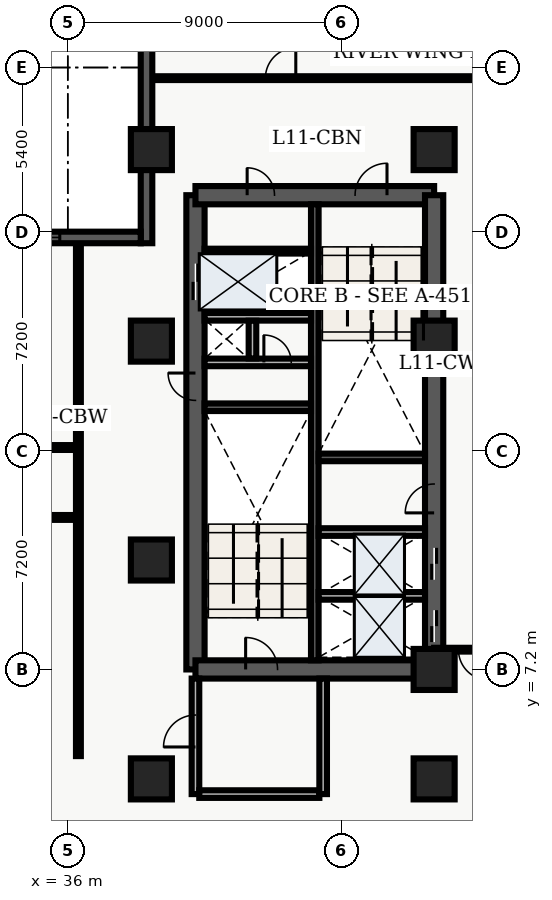
"""IFC4 building model, lengths in metres.
Left out: names, types, materials, properties, quantities, classifications, styles, units other than length and angle.
Written with IfcOpenShell. Run it as: python <this file> out.ifc"""

import sys

from ifc_helpers import new_model, entity, si_unit, converted_unit, direction, frame, origin_with_axes, origin_2d_with_axis, place, context, subcontext, project, spatial, polyline, rectangle, outline, extrude, element, fill, save


model = new_model("IFC4")
c1 = context("Model", 3, precision=1e-05, world=origin_with_axes(), true_north=direction((0.0, 1.0)))
c2 = subcontext(c1, "Body", "Model", "MODEL_VIEW")
j1 = project(units=[si_unit("LENGTHUNIT", "METRE"), converted_unit("PLANEANGLEUNIT", "DEGREE", entity("IfcPlaneAngleMeasure", 0.017), si_unit("PLANEANGLEUNIT", "RADIAN"), dimensions=[0, 0, 0, 0, 0, 0, 0])], contexts=[c1])
p1 = place(None, origin_with_axes())
s1 = spatial("IfcSite", under=j1, at=p1, CompositionType="ELEMENT")
p2 = place(p1, origin_with_axes())
s2 = spatial("IfcBuilding", under=s1, at=p2, CompositionType="ELEMENT")
p3 = place(p2, frame((0.0, 0.0, 48.3), z_axis=(0.0, 0.0, 1.0), x_axis=(1.0, 0.0, 0.0)))
s3 = spatial("IfcBuildingStorey", under=s2, at=p3, CompositionType="ELEMENT", Elevation=48.3)
p4 = place(p3, frame((40.2, 7.2, 0.0), z_axis=(0.0, 0.0, 1.0), x_axis=(0.0, 1.0, 0.0)))
e1 = element("IfcWall", 1, at=p4, inside=s3, PredefinedType="SHEAR", context=c2, shape_type="SweptSolid", body=[
    extrude(outline(polyline([(0.0, -0.3), (15.6, -0.3), (15.6, 0.3), (0.0, 0.3), (0.0, -0.3)])), origin_with_axes(), (0.0, 0.0, 1.0), 3.66),
])
p5 = place(p4, frame((12.75, 0.0, 0.0), z_axis=(0.0, 0.0, 1.0), x_axis=(1.0, 0.0, 0.0)))
e2 = element("IfcOpeningElement", 2, at=p5, cuts=e1, PredefinedType="OPENING", context=c2, shape_type="SweptSolid", body=[
    extrude(rectangle(XDim=1.2, YDim=0.62, at=origin_2d_with_axis()), origin_with_axes(), (0.0, 0.0, 1.0), 2.15),
])
p6 = place(p4, frame((9.3, 0.0, 0.0), z_axis=(0.0, 0.0, 1.0), x_axis=(1.0, 0.0, 0.0)))
e3 = element("IfcOpeningElement", 3, at=p6, cuts=e1, PredefinedType="OPENING", context=c2, shape_type="SweptSolid", body=[
    extrude(rectangle(XDim=0.9, YDim=0.62, at=origin_2d_with_axis()), origin_with_axes(), (0.0, 0.0, 1.0), 2.15),
])
p7 = place(p3, frame((40.2, 7.2, 0.0), z_axis=(0.0, 0.0, 1.0), x_axis=(1.0, 0.0, 0.0)))
e4 = element("IfcWall", 4, at=p7, inside=s3, PredefinedType="SHEAR", context=c2, shape_type="SweptSolid", body=[
    extrude(outline(polyline([(0.0, -0.3), (7.85, -0.3), (7.85, 0.3), (0.0, 0.3), (0.0, -0.3)])), origin_with_axes(), (0.0, 0.0, 1.0), 3.66),
])
p8 = place(p7, frame((2.175, 0.0, 0.0), z_axis=(0.0, 0.0, 1.0), x_axis=(1.0, 0.0, 0.0)))
e5 = element("IfcOpeningElement", 5, at=p8, cuts=e4, PredefinedType="OPENING", context=c2, shape_type="SweptSolid", body=[
    extrude(rectangle(XDim=1.05, YDim=0.62, at=origin_2d_with_axis()), origin_with_axes(), (0.0, 0.0, 1.0), 2.15),
])
p9 = place(p3, frame((40.2, 22.8, 0.0), z_axis=(0.0, 0.0, 1.0), x_axis=(1.0, 0.0, 0.0)))
e6 = element("IfcWall", 6, at=p9, inside=s3, PredefinedType="SHEAR", context=c2, shape_type="SweptSolid", body=[
    extrude(outline(polyline([(0.0, -0.3), (7.85, -0.3), (7.85, 0.3), (0.0, 0.3), (0.0, -0.3)])), origin_with_axes(), (0.0, 0.0, 1.0), 3.66),
])
p10 = place(p9, frame((5.775, 0.0, 0.0), z_axis=(0.0, 0.0, 1.0), x_axis=(1.0, 0.0, 0.0)))
e7 = element("IfcOpeningElement", 7, at=p10, cuts=e6, PredefinedType="OPENING", context=c2, shape_type="SweptSolid", body=[
    extrude(rectangle(XDim=1.05, YDim=0.62, at=origin_2d_with_axis()), origin_with_axes(), (0.0, 0.0, 1.0), 2.15),
])
p11 = place(p9, frame((2.15, 0.0, 0.0), z_axis=(0.0, 0.0, 1.0), x_axis=(1.0, 0.0, 0.0)))
e8 = element("IfcOpeningElement", 8, at=p11, cuts=e6, PredefinedType="OPENING", context=c2, shape_type="SweptSolid", body=[
    extrude(rectangle(XDim=0.9, YDim=0.62, at=origin_2d_with_axis()), origin_with_axes(), (0.0, 0.0, 1.0), 2.15),
])
p12 = place(p3, frame((48.05, 7.2, 0.0), z_axis=(0.0, 0.0, 1.0), x_axis=(0.0, 1.0, 0.0)))
e9 = element("IfcWall", 9, at=p12, inside=s3, PredefinedType="SHEAR", context=c2, shape_type="SweptSolid", body=[
    extrude(outline(polyline([(0.0, -0.3), (15.6, -0.3), (15.6, 0.3), (0.0, 0.3), (0.0, -0.3)])), origin_with_axes(), (0.0, 0.0, 1.0), 3.66),
])
p13 = place(p12, frame((1.425, 0.0, 0.0), z_axis=(0.0, 0.0, 1.0), x_axis=(1.0, 0.0, 0.0)))
e10 = element("IfcOpeningElement", 10, at=p13, cuts=e9, PredefinedType="OPENING", context=c2, shape_type="SweptSolid", body=[
    extrude(rectangle(XDim=1.05, YDim=0.62, at=origin_2d_with_axis()), origin_with_axes(), (0.0, 0.0, 1.0), 2.15),
])
p14 = place(p12, frame((3.475, 0.0, 0.0), z_axis=(0.0, 0.0, 1.0), x_axis=(1.0, 0.0, 0.0)))
e11 = element("IfcOpeningElement", 11, at=p14, cuts=e9, PredefinedType="OPENING", context=c2, shape_type="SweptSolid", body=[
    extrude(rectangle(XDim=1.05, YDim=0.62, at=origin_2d_with_axis()), origin_with_axes(), (0.0, 0.0, 1.0), 2.15),
])
p15 = place(p12, frame((5.625, 0.0, 0.0), z_axis=(0.0, 0.0, 1.0), x_axis=(1.0, 0.0, 0.0)))
e12 = element("IfcOpeningElement", 12, at=p15, cuts=e9, PredefinedType="OPENING", context=c2, shape_type="SweptSolid", body=[
    extrude(rectangle(XDim=0.95, YDim=0.62, at=origin_2d_with_axis()), origin_with_axes(), (0.0, 0.0, 1.0), 2.15),
])
p16 = place(p3, frame((44.125, 7.5, 0.0), z_axis=(0.0, 0.0, 1.0), x_axis=(0.0, 1.0, 0.0)))
e13 = element("IfcWall", 13, at=p16, inside=s3, PredefinedType="SHEAR", context=c2, shape_type="SweptSolid", body=[
    extrude(outline(polyline([(0.0, -0.125), (15.0, -0.125), (15.0, 0.125), (0.0, 0.125), (0.0, -0.125)])), origin_with_axes(), (0.0, 0.0, 1.0), 3.66),
])
for number, where, z_axis, x_axis in (
    (14, (40.5, 15.825, 0.0), (0.0, 0.0, 1.0), (1.0, 0.0, 0.0)),
    (15, (44.25, 14.175, 0.0), (0.0, 0.0, 1.0), (1.0, 0.0, 0.0)),
):
    element("IfcWall", number, at=place(p3, frame(where, z_axis=z_axis, x_axis=x_axis)), inside=s3, PredefinedType="SHEAR", context=c2, shape_type="SweptSolid", body=[
        extrude(outline(polyline([(0.0, -0.125), (3.5, -0.125), (3.5, 0.125), (0.0, 0.125), (0.0, -0.125)])), origin_with_axes(), (0.0, 0.0, 1.0), 3.66),
    ])
p17 = place(p3, frame((40.5, 17.3, 0.0), z_axis=(0.0, 0.0, 1.0), x_axis=(1.0, 0.0, 0.0)))
e16 = element("IfcWall", 16, at=p17, inside=s3, PredefinedType="SOLIDWALL", context=c2, shape_type="SweptSolid", body=[
    extrude(outline(polyline([(0.0, -0.125), (3.5, -0.125), (3.5, 0.125), (0.0, 0.125), (0.0, -0.125)])), origin_with_axes(), (0.0, 0.0, 1.0), 2.7),
])
p18 = place(p17, frame((2.4, 0.0, 0.0), z_axis=(0.0, 0.0, 1.0), x_axis=(1.0, 0.0, 0.0)))
e17 = element("IfcOpeningElement", 17, at=p18, cuts=e16, PredefinedType="OPENING", context=c2, shape_type="SweptSolid", body=[
    extrude(rectangle(XDim=0.9, YDim=0.27, at=origin_2d_with_axis()), origin_with_axes(), (0.0, 0.0, 1.0), 2.15),
])
p19 = place(p3, frame((40.5, 18.8, 0.0), z_axis=(0.0, 0.0, 1.0), x_axis=(1.0, 0.0, 0.0)))
e18 = element("IfcWall", 18, at=p19, inside=s3, PredefinedType="SOLIDWALL", context=c2, shape_type="SweptSolid", body=[
    extrude(outline(polyline([(0.0, -0.125), (3.5, -0.125), (3.5, 0.125), (0.0, 0.125), (0.0, -0.125)])), origin_with_axes(), (0.0, 0.0, 1.0), 2.7),
])
p20 = place(p3, frame((42.075, 17.43, 0.0), z_axis=(0.0, 0.0, 1.0), x_axis=(0.0, 1.0, 0.0)))
e19 = element("IfcWall", 19, at=p20, inside=s3, PredefinedType="SOLIDWALL", context=c2, shape_type="SweptSolid", body=[
    extrude(outline(polyline([(0.0, -0.125), (1.24, -0.125), (1.24, 0.125), (0.0, 0.125), (0.0, -0.125)])), origin_with_axes(), (0.0, 0.0, 1.0), 2.7),
])
p21 = place(p3, frame((40.2, 3.1, 0.0), z_axis=(0.0, 0.0, 1.0), x_axis=(0.0, 1.0, 0.0)))
e20 = element("IfcWall", 20, at=p21, inside=s3, PredefinedType="SOLIDWALL", context=c2, shape_type="SweptSolid", body=[
    extrude(outline(polyline([(0.0, -0.125), (3.8, -0.125), (3.8, 0.125), (0.0, 0.125), (0.0, -0.125)])), origin_with_axes(), (0.0, 0.0, 1.0), 2.7),
])
p22 = place(p21, frame((2.075, 0.0, 0.0), z_axis=(0.0, 0.0, 1.0), x_axis=(1.0, 0.0, 0.0)))
e21 = element("IfcOpeningElement", 21, at=p22, cuts=e20, PredefinedType="OPENING", context=c2, shape_type="SweptSolid", body=[
    extrude(rectangle(XDim=1.05, YDim=0.27, at=origin_2d_with_axis()), origin_with_axes(), (0.0, 0.0, 1.0), 2.15),
])
p23 = place(p3, frame((40.325, 3.1, 0.0), z_axis=(0.0, 0.0, 1.0), x_axis=(1.0, 0.0, 0.0)))
e22 = element("IfcWall", 22, at=p23, inside=s3, PredefinedType="SOLIDWALL", context=c2, shape_type="SweptSolid", body=[
    extrude(outline(polyline([(0.0, -0.125), (3.95, -0.125), (3.95, 0.125), (0.0, 0.125), (0.0, -0.125)])), origin_with_axes(), (0.0, 0.0, 1.0), 2.7),
])
p24 = place(p3, frame((44.4, 3.1, 0.0), z_axis=(0.0, 0.0, 1.0), x_axis=(0.0, 1.0, 0.0)))
e23 = element("IfcWall", 23, at=p24, inside=s3, PredefinedType="SOLIDWALL", context=c2, shape_type="SweptSolid", body=[
    extrude(outline(polyline([(0.0, -0.125), (3.8, -0.125), (3.8, 0.125), (0.0, 0.125), (0.0, -0.125)])), origin_with_axes(), (0.0, 0.0, 1.0), 2.7),
])
for number, where, z_axis, x_axis in (
    (24, (38.75, 3.6, 0.0), (0.0, 0.0, 1.0), (1.0, 0.0, 0.0)),
    (25, (38.75, 10.8, 0.0), (0.0, 0.0, 1.0), (1.0, 0.0, 0.0)),
    (26, (38.75, 18.0, 0.0), (0.0, 0.0, 1.0), (1.0, 0.0, 0.0)),
    (27, (38.75, 24.3, 0.0), (0.0, 0.0, 1.0), (1.0, 0.0, 0.0)),
    (28, (48.05, 3.6, 0.0), (0.0, 0.0, 1.0), (1.0, 0.0, 0.0)),
    (29, (48.05, 7.2, 0.0), (0.0, 0.0, 1.0), (1.0, 0.0, 0.0)),
    (30, (48.05, 18.0, 0.0), (0.0, 0.0, 1.0), (1.0, 0.0, 0.0)),
    (31, (48.05, 24.3, 0.0), (0.0, 0.0, 1.0), (1.0, 0.0, 0.0)),
):
    element("IfcColumn", number, at=place(p3, frame(where, z_axis=z_axis, x_axis=x_axis)), inside=s3, PredefinedType="COLUMN", context=c2, shape_type="SweptSolid", body=[
        extrude(rectangle(XDim=1.35, YDim=1.35, at=origin_2d_with_axis()), origin_with_axes(), (0.0, 0.0, 1.0), 3.9),
    ])
p25 = place(p3, frame((40.5, 20.96, 0.0), z_axis=(0.0, 0.0, 1.0), x_axis=(1.0, 0.0, 0.0)))
e32 = element("IfcWall", 32, at=p25, inside=s3, PredefinedType="PARTITIONING", context=c2, shape_type="SweptSolid", body=[
    extrude(outline(polyline([(0.0, -0.08), (3.5, -0.08), (3.5, 0.08), (0.0, 0.08), (0.0, -0.08)])), origin_with_axes(), (0.0, 0.0, 1.0), 2.7),
])
for number, where, z_axis, x_axis in (
    (33, (44.25, 9.62, 0.0), (0.0, 0.0, 1.0), (1.0, 0.0, 0.0)),
    (34, (44.25, 11.72, 0.0), (0.0, 0.0, 1.0), (1.0, 0.0, 0.0)),
):
    element("IfcWall", number, at=place(p3, frame(where, z_axis=z_axis, x_axis=x_axis)), inside=s3, PredefinedType="SOLIDWALL", context=c2, shape_type="SweptSolid", body=[
        extrude(outline(polyline([(0.0, -0.125), (3.5, -0.125), (3.5, 0.125), (0.0, 0.125), (0.0, -0.125)])), origin_with_axes(), (0.0, 0.0, 1.0), 2.7),
    ])
p26 = place(p3, frame((21.15, 12.2, 0.0), z_axis=(0.0, 0.0, 1.0), x_axis=(1.0, 0.0, 0.0)))
e35 = element("IfcWall", 35, at=p26, inside=s3, PredefinedType="PARTITIONING", context=c2, shape_type="SweptSolid", body=[
    extrude(outline(polyline([(0.0, -0.08), (15.2, -0.08), (15.2, 0.08), (0.0, 0.08), (0.0, -0.08)])), origin_with_axes(), (0.0, 0.0, 1.0), 2.7),
])
p27 = place(p26, frame((3.477, 0.0, 0.0), z_axis=(0.0, 0.0, 1.0), x_axis=(1.0, 0.0, 0.0)))
e36 = element("IfcOpeningElement", 36, at=p27, cuts=e35, PredefinedType="OPENING", context=c2, shape_type="SweptSolid", body=[
    extrude(rectangle(XDim=1.0, YDim=0.18, at=origin_2d_with_axis()), origin_with_axes(), (0.0, 0.0, 1.0), 2.15),
])
p28 = place(p26, frame((10.947, 0.0, 0.0), z_axis=(0.0, 0.0, 1.0), x_axis=(1.0, 0.0, 0.0)))
e37 = element("IfcOpeningElement", 37, at=p28, cuts=e35, PredefinedType="OPENING", context=c2, shape_type="SweptSolid", body=[
    extrude(rectangle(XDim=1.0, YDim=0.18, at=origin_2d_with_axis()), origin_with_axes(), (0.0, 0.0, 1.0), 2.15),
])
p29 = place(p3, frame((21.15, 14.5, 0.0), z_axis=(0.0, 0.0, 1.0), x_axis=(1.0, 0.0, 0.0)))
e38 = element("IfcWall", 38, at=p29, inside=s3, PredefinedType="PARTITIONING", context=c2, shape_type="SweptSolid", body=[
    extrude(outline(polyline([(0.0, -0.08), (15.2, -0.08), (15.2, 0.08), (0.0, 0.08), (0.0, -0.08)])), origin_with_axes(), (0.0, 0.0, 1.0), 2.7),
])
p30 = place(p29, frame((2.303, 0.0, 0.0), z_axis=(0.0, 0.0, 1.0), x_axis=(1.0, 0.0, 0.0)))
e39 = element("IfcOpeningElement", 39, at=p30, cuts=e38, PredefinedType="OPENING", context=c2, shape_type="SweptSolid", body=[
    extrude(rectangle(XDim=1.0, YDim=0.18, at=origin_2d_with_axis()), origin_with_axes(), (0.0, 0.0, 1.0), 2.15),
])
p31 = place(p29, frame((6.851, 0.0, 0.0), z_axis=(0.0, 0.0, 1.0), x_axis=(1.0, 0.0, 0.0)))
e40 = element("IfcOpeningElement", 40, at=p31, cuts=e38, PredefinedType="OPENING", context=c2, shape_type="SweptSolid", body=[
    extrude(rectangle(XDim=1.2, YDim=0.18, at=origin_2d_with_axis()), origin_with_axes(), (0.0, 0.0, 1.0), 2.2),
])
p32 = place(p29, frame((12.198, 0.0, 0.0), z_axis=(0.0, 0.0, 1.0), x_axis=(1.0, 0.0, 0.0)))
e41 = element("IfcOpeningElement", 41, at=p32, cuts=e38, PredefinedType="OPENING", context=c2, shape_type="SweptSolid", body=[
    extrude(rectangle(XDim=1.0, YDim=0.18, at=origin_2d_with_axis()), origin_with_axes(), (0.0, 0.0, 1.0), 2.15),
])
p33 = place(p3, frame((36.35, 4.35, 0.0), z_axis=(0.0, 0.0, 1.0), x_axis=(0.0, 1.0, 0.0)))
e42 = element("IfcWall", 42, at=p33, inside=s3, PredefinedType="PARTITIONING", context=c2, shape_type="SweptSolid", body=[
    extrude(outline(polyline([(0.0, -0.08), (16.95, -0.08), (16.95, 0.08), (0.0, 0.08), (0.0, -0.08)])), origin_with_axes(), (0.0, 0.0, 1.0), 2.7),
])
p34 = place(p3, frame((59.64, 7.85, 0.0), z_axis=(0.0, 0.0, 1.0), x_axis=(-1.0, 0.0, 0.0)))
e43 = element("IfcWall", 43, at=p34, inside=s3, PredefinedType="PARTITIONING", context=c2, shape_type="SweptSolid", body=[
    extrude(outline(polyline([(0.0, -0.062), (11.59, -0.062), (11.59, 0.062), (0.0, 0.062), (0.0, -0.062)])), origin_with_axes(), (0.0, 0.0, 1.0), 2.7),
])
p35 = place(p34, frame((10.29, 0.0, 0.0), z_axis=(0.0, 0.0, 1.0), x_axis=(1.0, 0.0, 0.0)))
e44 = element("IfcOpeningElement", 44, at=p35, cuts=e43, PredefinedType="OPENING", context=c2, shape_type="SweptSolid", body=[
    extrude(rectangle(XDim=1.0, YDim=0.145, at=origin_2d_with_axis()), origin_with_axes(), (0.0, 0.0, 1.0), 2.15),
])
p36 = place(p3, frame((38.76, 26.65, 0.0), z_axis=(0.0, 0.0, 1.0), x_axis=(1.0, 0.0, 0.0)))
e45 = element("IfcWall", 45, at=p36, inside=s3, PredefinedType="PARTITIONING", context=c2, shape_type="SweptSolid", body=[
    extrude(outline(polyline([(0.0, -0.062), (20.88, -0.062), (20.88, 0.062), (0.0, 0.062), (0.0, -0.062)])), origin_with_axes(), (0.0, 0.0, 1.0), 2.7),
])
p37 = place(p36, frame((4.24, 0.0, 0.0), z_axis=(0.0, 0.0, 1.0), x_axis=(1.0, 0.0, 0.0)))
e46 = element("IfcOpeningElement", 46, at=p37, cuts=e45, PredefinedType="OPENING", context=c2, shape_type="SweptSolid", body=[
    extrude(rectangle(XDim=1.0, YDim=0.145, at=origin_2d_with_axis()), origin_with_axes(), (0.0, 0.0, 1.0), 2.15),
])
p38 = place(p3, frame((38.59, 21.22, 0.0), z_axis=(0.0, 0.0, 1.0), x_axis=(0.0, 1.0, 0.0)))
e47 = element("IfcWall", 47, at=p38, inside=s3, PredefinedType="SOLIDWALL", context=c2, shape_type="SweptSolid", body=[
    extrude(outline(polyline([(0.0, -0.19), (7.58, -0.19), (7.58, 0.19), (0.0, 0.19), (0.0, -0.19)])), origin_with_axes(), (0.0, 0.0, 1.0), 3.66),
])
p39 = place(p3, frame((21.22, 21.41, 0.0), z_axis=(0.0, 0.0, 1.0), x_axis=(1.0, 0.0, 0.0)))
e48 = element("IfcWall", 48, at=p39, inside=s3, PredefinedType="SOLIDWALL", context=c2, shape_type="SweptSolid", body=[
    extrude(outline(polyline([(0.0, -0.19), (17.18, -0.19), (17.18, 0.19), (0.0, 0.19), (0.0, -0.19)])), origin_with_axes(), (0.0, 0.0, 1.0), 3.66),
])
p40 = place(p39, frame((2.413, 0.0, 0.45), z_axis=(0.0, 0.0, 1.0), x_axis=(1.0, 0.0, 0.0)))
e49 = element("IfcOpeningElement", 49, at=p40, cuts=e48, PredefinedType="OPENING", context=c2, shape_type="SweptSolid", body=[
    extrude(rectangle(XDim=2.1, YDim=0.4, at=origin_2d_with_axis()), origin_with_axes(), (0.0, 0.0, 1.0), 2.2),
])
p41 = place(p39, frame((13.467, 0.0, 0.45), z_axis=(0.0, 0.0, 1.0), x_axis=(1.0, 0.0, 0.0)))
e50 = element("IfcOpeningElement", 50, at=p41, cuts=e48, PredefinedType="OPENING", context=c2, shape_type="SweptSolid", body=[
    extrude(rectangle(XDim=2.1, YDim=0.4, at=origin_2d_with_axis()), origin_with_axes(), (0.0, 0.0, 1.0), 2.2),
])
p42 = place(p12, frame((1.425, 0.0, 0.0), z_axis=(0.0, 0.0, 1.0), x_axis=(1.0, 0.0, 0.0)))
e51 = element("IfcDoor", 51, at=p42, inside=s3, OperationType="SLIDING_TO_LEFT", PredefinedType="DOOR", context=c2, shape_type="SweptSolid", body=[
    extrude(rectangle(XDim=1.05, YDim=0.09, at=origin_2d_with_axis()), origin_with_axes(), (0.0, 0.0, 1.0), 2.15),
])
fill(e10, e51)
p43 = place(p12, frame((3.475, 0.0, 0.0), z_axis=(0.0, 0.0, 1.0), x_axis=(1.0, 0.0, 0.0)))
e52 = element("IfcDoor", 52, at=p43, inside=s3, OperationType="SLIDING_TO_RIGHT", PredefinedType="DOOR", context=c2, shape_type="SweptSolid", body=[
    extrude(rectangle(XDim=1.05, YDim=0.09, at=origin_2d_with_axis()), origin_with_axes(), (0.0, 0.0, 1.0), 2.15),
])
fill(e11, e52)
p44 = place(p4, frame((12.75, 0.0, 0.0), z_axis=(0.0, 0.0, 1.0), x_axis=(1.0, 0.0, 0.0)))
e53 = element("IfcDoor", 53, at=p44, inside=s3, OperationType="DOUBLE_DOOR_SLIDING", PredefinedType="DOOR", context=c2, shape_type="SweptSolid", body=[
    extrude(rectangle(XDim=1.2, YDim=0.09, at=origin_2d_with_axis()), origin_with_axes(), (0.0, 0.0, 1.0), 2.15),
])
fill(e2, e53)
p45 = place(p4, frame((9.3, 0.0, 0.0), z_axis=(0.0, 0.0, 1.0), x_axis=(1.0, 0.0, 0.0)))
e54 = element("IfcDoor", 54, at=p45, inside=s3, OperationType="SINGLE_SWING_RIGHT", PredefinedType="DOOR", context=c2, shape_type="SweptSolid", body=[
    extrude(rectangle(XDim=0.9, YDim=0.09, at=origin_2d_with_axis()), origin_with_axes(), (0.0, 0.0, 1.0), 2.15),
])
fill(e3, e54)
p46 = place(p17, frame((2.4, 0.0, 0.0), z_axis=(0.0, 0.0, 1.0), x_axis=(1.0, 0.0, 0.0)))
e55 = element("IfcDoor", 55, at=p46, inside=s3, OperationType="SINGLE_SWING_LEFT", PredefinedType="DOOR", context=c2, shape_type="SweptSolid", body=[
    extrude(rectangle(XDim=0.9, YDim=0.09, at=origin_2d_with_axis()), origin_with_axes(), (0.0, 0.0, 1.0), 2.15),
])
fill(e17, e55)
p47 = place(p7, frame((2.175, 0.0, 0.0), z_axis=(0.0, 0.0, 1.0), x_axis=(1.0, 0.0, 0.0)))
e56 = element("IfcDoor", 56, at=p47, inside=s3, OperationType="SINGLE_SWING_LEFT", PredefinedType="DOOR", context=c2, shape_type="SweptSolid", body=[
    extrude(rectangle(XDim=1.05, YDim=0.09, at=origin_2d_with_axis()), origin_with_axes(), (0.0, 0.0, 1.0), 2.15),
])
fill(e5, e56)
p48 = place(p9, frame((5.775, 0.0, 0.0), z_axis=(0.0, 0.0, 1.0), x_axis=(1.0, 0.0, 0.0)))
e57 = element("IfcDoor", 57, at=p48, inside=s3, OperationType="SINGLE_SWING_RIGHT", PredefinedType="DOOR", context=c2, shape_type="SweptSolid", body=[
    extrude(rectangle(XDim=1.05, YDim=0.09, at=origin_2d_with_axis()), origin_with_axes(), (0.0, 0.0, 1.0), 2.15),
])
fill(e7, e57)
p49 = place(p21, frame((2.075, 0.0, 0.0), z_axis=(0.0, 0.0, 1.0), x_axis=(1.0, 0.0, 0.0)))
e58 = element("IfcDoor", 58, at=p49, inside=s3, OperationType="SINGLE_SWING_LEFT", PredefinedType="DOOR", context=c2, shape_type="SweptSolid", body=[
    extrude(rectangle(XDim=1.05, YDim=0.09, at=origin_2d_with_axis()), origin_with_axes(), (0.0, 0.0, 1.0), 2.15),
])
fill(e21, e58)
p50 = place(p9, frame((2.15, 0.0, 0.0), z_axis=(0.0, 0.0, 1.0), x_axis=(1.0, 0.0, 0.0)))
e59 = element("IfcDoor", 59, at=p50, inside=s3, OperationType="SINGLE_SWING_LEFT", PredefinedType="DOOR", context=c2, shape_type="SweptSolid", body=[
    extrude(rectangle(XDim=0.9, YDim=0.09, at=origin_2d_with_axis()), origin_with_axes(), (0.0, 0.0, 1.0), 2.15),
])
fill(e8, e59)
p51 = place(p12, frame((5.625, 0.0, 0.0), z_axis=(0.0, 0.0, 1.0), x_axis=(1.0, 0.0, 0.0)))
e60 = element("IfcDoor", 60, at=p51, inside=s3, OperationType="SINGLE_SWING_LEFT", PredefinedType="DOOR", context=c2, shape_type="SweptSolid", body=[
    extrude(rectangle(XDim=0.95, YDim=0.09, at=origin_2d_with_axis()), origin_with_axes(), (0.0, 0.0, 1.0), 2.15),
])
fill(e12, e60)
p52 = place(p34, frame((10.29, 0.0, 0.0), z_axis=(0.0, 0.0, 1.0), x_axis=(1.0, 0.0, 0.0)))
e61 = element("IfcDoor", 61, at=p52, inside=s3, OperationType="SINGLE_SWING_LEFT", PredefinedType="DOOR", context=c2, shape_type="SweptSolid", body=[
    extrude(rectangle(XDim=1.0, YDim=0.075, at=origin_2d_with_axis()), origin_with_axes(), (0.0, 0.0, 1.0), 2.15),
])
fill(e44, e61)
p53 = place(p36, frame((4.24, 0.0, 0.0), z_axis=(0.0, 0.0, 1.0), x_axis=(1.0, 0.0, 0.0)))
e62 = element("IfcDoor", 62, at=p53, inside=s3, OperationType="SINGLE_SWING_RIGHT", PredefinedType="DOOR", context=c2, shape_type="SweptSolid", body=[
    extrude(rectangle(XDim=1.0, YDim=0.075, at=origin_2d_with_axis()), origin_with_axes(), (0.0, 0.0, 1.0), 2.15),
])
fill(e46, e62)
p54 = place(p39, frame((13.467, 0.0, 0.45), z_axis=(0.0, 0.0, 1.0), x_axis=(1.0, 0.0, 0.0)))
e63 = element("IfcWindow", 63, at=p54, inside=s3, PredefinedType="WINDOW", context=c2, shape_type="SweptSolid", body=[
    extrude(rectangle(XDim=2.1, YDim=0.09, at=origin_2d_with_axis()), origin_with_axes(), (0.0, 0.0, 1.0), 2.2),
])
fill(e50, e63)
save(model, sys.argv[1])
